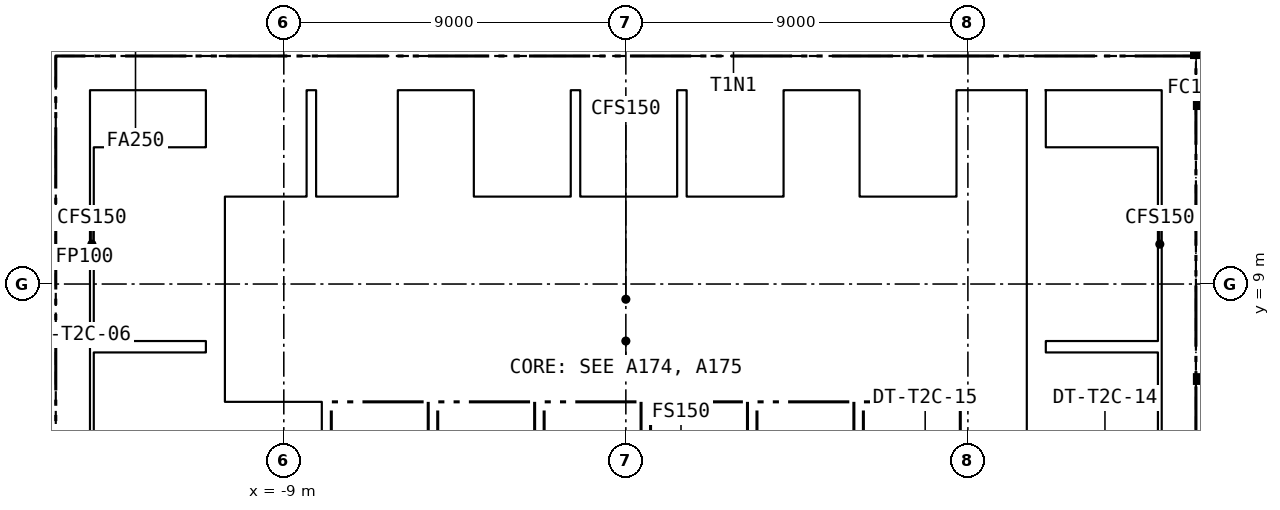
"""IFC4 building model, lengths in metres.
Left out: names, types, materials, properties, quantities, classifications, styles, units other than length and angle.
Written with IfcOpenShell. Run it as: python <this file> out.ifc"""

import sys

from ifc_helpers import new_model, si_unit, direction, frame, frame_2d, origin, place, context, subcontext, project, spatial, rectangle, extrude, element, fill, save


model = new_model("IFC4")
c1 = context("Model", 3, precision=1e-05, world=origin(), true_north=direction((0.0, 1.0)))
c2 = subcontext(c1, "Body", "Model", "MODEL_VIEW")
j1 = project(units=[si_unit("LENGTHUNIT", "METRE"), si_unit("PLANEANGLEUNIT", "RADIAN")], contexts=[c1])
p1 = place(None, origin())
s1 = spatial("IfcSite", under=j1, at=p1, CompositionType="ELEMENT")
p2 = place(p1, origin())
s2 = spatial("IfcBuilding", under=s1, at=p2, CompositionType="ELEMENT")
p3 = place(p2, frame((0.0, 0.0, 102.55)))
s3 = spatial("IfcBuildingStorey", under=s2, at=p3, CompositionType="ELEMENT", Elevation=102.55)
p4 = place(p3, frame((-15.0, 14.55, -0.15), z_axis=(0.0, 0.0, 1.0), x_axis=(1.0, 0.0, 0.0)))
e1 = element("IfcWall", 1, at=p4, inside=s3, PredefinedType="SOLIDWALL", context=c2, shape_type="SweptSolid", body=[
    extrude(rectangle(XDim=30.0, YDim=0.9, at=frame_2d((15.0, 0.0))), origin(), (0.0, 0.0, 1.0), 3.65),
])
p5 = place(p4, frame((9.25, 0.0, 0.15)))
e2 = element("IfcOpeningElement", 2, at=p5, cuts=e1, PredefinedType="OPENING", context=c2, shape_type="SweptSolid", body=[
    extrude(rectangle(XDim=1.5, YDim=2.1, at=frame_2d((0.75, 1.05))), frame((0.0, 0.46, 0.0), z_axis=(0.0, -1.0, 0.0), x_axis=(1.0, 0.0, 0.0)), (0.0, 0.0, 1.0), 0.92),
])
p6 = place(p4, frame((19.4, 0.0, 0.15)))
e3 = element("IfcOpeningElement", 3, at=p6, cuts=e1, PredefinedType="OPENING", context=c2, shape_type="SweptSolid", body=[
    extrude(rectangle(XDim=1.5, YDim=2.1, at=frame_2d((0.75, 1.05))), frame((0.0, 0.46, 0.0), z_axis=(0.0, -1.0, 0.0), x_axis=(1.0, 0.0, 0.0)), (0.0, 0.0, 1.0), 0.92),
])
p7 = place(p4, frame((1.5, 0.0, 0.15)))
e4 = element("IfcOpeningElement", 4, at=p7, cuts=e1, PredefinedType="OPENING", context=c2, shape_type="SweptSolid", body=[
    extrude(rectangle(XDim=1.2, YDim=2.1, at=frame_2d((0.6, 1.05))), frame((0.0, 0.46, 0.0), z_axis=(0.0, -1.0, 0.0), x_axis=(1.0, 0.0, 0.0)), (0.0, 0.0, 1.0), 0.92),
])
p8 = place(p4, frame((27.3, 0.0, 0.15)))
e5 = element("IfcOpeningElement", 5, at=p8, cuts=e1, PredefinedType="OPENING", context=c2, shape_type="SweptSolid", body=[
    extrude(rectangle(XDim=1.2, YDim=2.1, at=frame_2d((0.6, 1.05))), frame((0.0, 0.46, 0.0), z_axis=(0.0, -1.0, 0.0), x_axis=(1.0, 0.0, 0.0)), (0.0, 0.0, 1.0), 0.92),
])
for number, where, z_axis, x_axis in (
    (6, (-14.55, 0.9, -0.15), (0.0, 0.0, 1.0), (0.0, 1.0, 0.0)),
    (7, (14.55, 0.9, -0.15), (0.0, 0.0, 1.0), (0.0, 1.0, 0.0)),
):
    element("IfcWall", number, at=place(p3, frame(where, z_axis=z_axis, x_axis=x_axis)), inside=s3, PredefinedType="SOLIDWALL", context=c2, shape_type="SweptSolid", body=[
        extrude(rectangle(XDim=13.2, YDim=0.9, at=frame_2d((6.6, 0.0))), origin(), (0.0, 0.0, 1.0), 3.65),
    ])
for number, where, z_axis, x_axis in (
    (8, (-10.8, 0.9, -0.15), (0.0, 0.0, 1.0), (0.0, 1.0, 0.0)),
    (9, (10.8, 0.9, -0.15), (0.0, 0.0, 1.0), (0.0, 1.0, 0.0)),
):
    element("IfcWall", number, at=place(p3, frame(where, z_axis=z_axis, x_axis=x_axis)), inside=s3, PredefinedType="SOLIDWALL", context=c2, shape_type="SweptSolid", body=[
        extrude(rectangle(XDim=13.2, YDim=0.5, at=frame_2d((6.6, 0.0))), origin(), (0.0, 0.0, 1.0), 3.65),
    ])
p9 = place(p3, frame((-10.55, 6.025, 0.0), z_axis=(0.0, 0.0, 1.0), x_axis=(1.0, 0.0, 0.0)))
e10 = element("IfcWall", 10, at=p9, inside=s3, PredefinedType="PARTITIONING", context=c2, shape_type="SweptSolid", body=[
    extrude(rectangle(XDim=21.1, YDim=0.25, at=frame_2d((10.55, 0.0))), origin(), (0.0, 0.0, 1.0), 3.5),
])
p10 = place(p3, frame((-4.125, 8.55, 0.0), z_axis=(0.0, 0.0, 1.0), x_axis=(1.0, 0.0, 0.0)))
e11 = element("IfcWall", 11, at=p10, inside=s3, PredefinedType="PARTITIONING", context=c2, shape_type="SweptSolid", body=[
    extrude(rectangle(XDim=14.675, YDim=0.2, at=frame_2d((7.337, 0.0))), origin(), (0.0, 0.0, 1.0), 3.5),
])
p11 = place(p10, frame((1.413, 0.0, 0.0)))
e12 = element("IfcOpeningElement", 12, at=p11, cuts=e11, PredefinedType="OPENING", context=c2, shape_type="SweptSolid", body=[
    extrude(rectangle(XDim=1.0, YDim=2.1, at=frame_2d((0.5, 1.05))), frame((0.0, 0.11, 0.0), z_axis=(0.0, -1.0, 0.0), x_axis=(1.0, 0.0, 0.0)), (0.0, 0.0, 1.0), 0.22),
])
p12 = place(p10, frame((5.0, 0.0, 0.0)))
e13 = element("IfcOpeningElement", 13, at=p12, cuts=e11, PredefinedType="OPENING", context=c2, shape_type="SweptSolid", body=[
    extrude(rectangle(XDim=1.0, YDim=2.1, at=frame_2d((0.5, 1.05))), frame((0.0, 0.11, 0.0), z_axis=(0.0, -1.0, 0.0), x_axis=(1.0, 0.0, 0.0)), (0.0, 0.0, 1.0), 0.22),
])
p13 = place(p10, frame((9.613, 0.0, 0.0)))
e14 = element("IfcOpeningElement", 14, at=p13, cuts=e11, PredefinedType="OPENING", context=c2, shape_type="SweptSolid", body=[
    extrude(rectangle(XDim=1.0, YDim=2.1, at=frame_2d((0.5, 1.05))), frame((0.0, 0.11, 0.0), z_axis=(0.0, -1.0, 0.0), x_axis=(1.0, 0.0, 0.0)), (0.0, 0.0, 1.0), 0.22),
])
p14 = place(p10, frame((13.475, 0.0, 0.0)))
e15 = element("IfcOpeningElement", 15, at=p14, cuts=e11, PredefinedType="OPENING", context=c2, shape_type="SweptSolid", body=[
    extrude(rectangle(XDim=0.9, YDim=2.1, at=frame_2d((0.45, 1.05))), frame((0.0, 0.11, 0.0), z_axis=(0.0, -1.0, 0.0), x_axis=(1.0, 0.0, 0.0)), (0.0, 0.0, 1.0), 0.22),
])
p15 = place(p3, frame((-10.55, 11.2, 0.0), z_axis=(0.0, 0.0, 1.0), x_axis=(1.0, 0.0, 0.0)))
e16 = element("IfcWall", 16, at=p15, inside=s3, PredefinedType="PARTITIONING", context=c2, shape_type="SweptSolid", body=[
    extrude(rectangle(XDim=4.8, YDim=0.2, at=frame_2d((2.4, 0.0))), origin(), (0.0, 0.0, 1.0), 3.5),
])
p16 = place(p15, frame((0.525, 0.0, 0.0)))
e17 = element("IfcOpeningElement", 17, at=p16, cuts=e16, PredefinedType="OPENING", context=c2, shape_type="SweptSolid", body=[
    extrude(rectangle(XDim=1.1, YDim=2.1, at=frame_2d((0.55, 1.05))), frame((0.0, 0.11, 0.0), z_axis=(0.0, -1.0, 0.0), x_axis=(1.0, 0.0, 0.0)), (0.0, 0.0, 1.0), 0.22),
])
p17 = place(p15, frame((2.925, 0.0, 0.0)))
e18 = element("IfcOpeningElement", 18, at=p17, cuts=e16, PredefinedType="OPENING", context=c2, shape_type="SweptSolid", body=[
    extrude(rectangle(XDim=1.1, YDim=2.1, at=frame_2d((0.55, 1.05))), frame((0.0, 0.11, 0.0), z_axis=(0.0, -1.0, 0.0), x_axis=(1.0, 0.0, 0.0)), (0.0, 0.0, 1.0), 0.22),
])
p18 = place(p3, frame((-4.25, 11.2, 0.0), z_axis=(0.0, 0.0, 1.0), x_axis=(1.0, 0.0, 0.0)))
e19 = element("IfcWall", 19, at=p18, inside=s3, PredefinedType="PARTITIONING", context=c2, shape_type="SweptSolid", body=[
    extrude(rectangle(XDim=8.65, YDim=0.2, at=frame_2d((4.325, 0.0))), origin(), (0.0, 0.0, 1.0), 3.5),
])
p19 = place(p18, frame((0.825, 0.0, 0.0)))
e20 = element("IfcOpeningElement", 20, at=p19, cuts=e19, PredefinedType="OPENING", context=c2, shape_type="SweptSolid", body=[
    extrude(rectangle(XDim=1.4, YDim=2.1, at=frame_2d((0.7, 1.05))), frame((0.0, 0.11, 0.0), z_axis=(0.0, -1.0, 0.0), x_axis=(1.0, 0.0, 0.0)), (0.0, 0.0, 1.0), 0.22),
])
p20 = place(p18, frame((3.625, 0.0, 0.0)))
e21 = element("IfcOpeningElement", 21, at=p20, cuts=e19, PredefinedType="OPENING", context=c2, shape_type="SweptSolid", body=[
    extrude(rectangle(XDim=1.4, YDim=2.1, at=frame_2d((0.7, 1.05))), frame((0.0, 0.11, 0.0), z_axis=(0.0, -1.0, 0.0), x_axis=(1.0, 0.0, 0.0)), (0.0, 0.0, 1.0), 0.22),
])
p21 = place(p3, frame((5.9, 11.2, 0.0), z_axis=(0.0, 0.0, 1.0), x_axis=(1.0, 0.0, 0.0)))
e22 = element("IfcWall", 22, at=p21, inside=s3, PredefinedType="PARTITIONING", context=c2, shape_type="SweptSolid", body=[
    extrude(rectangle(XDim=4.65, YDim=0.2, at=frame_2d((2.325, 0.0))), origin(), (0.0, 0.0, 1.0), 3.5),
])
p22 = place(p21, frame((3.4, 0.0, 0.0)))
e23 = element("IfcOpeningElement", 23, at=p22, cuts=e22, PredefinedType="OPENING", context=c2, shape_type="SweptSolid", body=[
    extrude(rectangle(XDim=0.9, YDim=2.1, at=frame_2d((0.45, 1.05))), frame((0.0, 0.11, 0.0), z_axis=(0.0, -1.0, 0.0), x_axis=(1.0, 0.0, 0.0)), (0.0, 0.0, 1.0), 0.22),
])
p23 = place(p3, frame((-4.125, 6.15, 0.0), z_axis=(0.0, 0.0, 1.0), x_axis=(0.0, 1.0, 0.0)))
e24 = element("IfcWall", 24, at=p23, inside=s3, PredefinedType="PARTITIONING", context=c2, shape_type="SweptSolid", body=[
    extrude(rectangle(XDim=4.95, YDim=0.25, at=frame_2d((2.475, 0.0))), origin(), (0.0, 0.0, 1.0), 3.5),
])
p24 = place(p23, frame((3.125, 0.0, 0.0)))
e25 = element("IfcOpeningElement", 25, at=p24, cuts=e24, PredefinedType="OPENING", context=c2, shape_type="SweptSolid", body=[
    extrude(rectangle(XDim=1.2, YDim=2.1, at=frame_2d((0.6, 1.05))), frame((0.0, 0.135, 0.0), z_axis=(0.0, -1.0, 0.0), x_axis=(1.0, 0.0, 0.0)), (0.0, 0.0, 1.0), 0.27),
])
for number, where, z_axis, x_axis in (
    (26, (-7.875, 3.6, 0.0), (0.0, 0.0, 1.0), (0.0, 1.0, 0.0)),
    (27, (-5.075, 3.6, 0.0), (0.0, 0.0, 1.0), (0.0, 1.0, 0.0)),
    (28, (-2.275, 3.6, 0.0), (0.0, 0.0, 1.0), (0.0, 1.0, 0.0)),
    (29, (0.525, 3.6, 0.0), (0.0, 0.0, 1.0), (0.0, 1.0, 0.0)),
    (30, (3.325, 3.6, 0.0), (0.0, 0.0, 1.0), (0.0, 1.0, 0.0)),
    (31, (6.125, 3.6, 0.0), (0.0, 0.0, 1.0), (0.0, 1.0, 0.0)),
    (32, (8.925, 3.6, 0.0), (0.0, 0.0, 1.0), (0.0, 1.0, 0.0)),
):
    element("IfcWall", number, at=place(p3, frame(where, z_axis=z_axis, x_axis=x_axis)), inside=s3, PredefinedType="PARTITIONING", context=c2, shape_type="SweptSolid", body=[
        extrude(rectangle(XDim=2.3, YDim=0.25, at=frame_2d((1.15, 0.0))), origin(), (0.0, 0.0, 1.0), 3.5),
    ])
for number, where, z_axis, x_axis in (
    (33, (-0.35, 6.15, 0.0), (0.0, 0.0, 1.0), (0.0, 1.0, 0.0)),
    (34, (3.1, 6.15, 0.0), (0.0, 0.0, 1.0), (0.0, 1.0, 0.0)),
):
    element("IfcWall", number, at=place(p3, frame(where, z_axis=z_axis, x_axis=x_axis)), inside=s3, PredefinedType="PARTITIONING", context=c2, shape_type="SweptSolid", body=[
        extrude(rectangle(XDim=2.3, YDim=0.15, at=frame_2d((1.15, 0.0))), origin(), (0.0, 0.0, 1.0), 3.5),
    ])
p25 = place(p3, frame((8.925, 6.15, 0.0), z_axis=(0.0, 0.0, 1.0), x_axis=(0.0, 1.0, 0.0)))
e35 = element("IfcWall", 35, at=p25, inside=s3, PredefinedType="PARTITIONING", context=c2, shape_type="SweptSolid", body=[
    extrude(rectangle(XDim=2.3, YDim=0.25, at=frame_2d((1.15, 0.0))), origin(), (0.0, 0.0, 1.0), 3.5),
])
for number, where, z_axis, x_axis in (
    (36, (-8.275, 11.3, 0.0), (0.0, 0.0, 1.0), (0.0, 1.0, 0.0)),
    (37, (-5.875, 11.3, 0.0), (0.0, 0.0, 1.0), (0.0, 1.0, 0.0)),
    (38, (-4.125, 11.3, 0.0), (0.0, 0.0, 1.0), (0.0, 1.0, 0.0)),
    (39, (-1.325, 11.3, 0.0), (0.0, 0.0, 1.0), (0.0, 1.0, 0.0)),
    (40, (1.475, 11.3, 0.0), (0.0, 0.0, 1.0), (0.0, 1.0, 0.0)),
    (41, (4.275, 11.3, 0.0), (0.0, 0.0, 1.0), (0.0, 1.0, 0.0)),
    (42, (6.025, 11.3, 0.0), (0.0, 0.0, 1.0), (0.0, 1.0, 0.0)),
    (43, (8.825, 11.3, 0.0), (0.0, 0.0, 1.0), (0.0, 1.0, 0.0)),
):
    element("IfcWall", number, at=place(p3, frame(where, z_axis=z_axis, x_axis=x_axis)), inside=s3, PredefinedType="PARTITIONING", context=c2, shape_type="SweptSolid", body=[
        extrude(rectangle(XDim=2.8, YDim=0.25, at=frame_2d((1.4, 0.0))), origin(), (0.0, 0.0, 1.0), 3.5),
    ])
p26 = place(p3, frame((-14.0, 7.35, 0.0), z_axis=(0.0, 0.0, 1.0), x_axis=(1.0, 0.0, 0.0)))
e44 = element("IfcWall", 44, at=p26, inside=s3, PredefinedType="SOLIDWALL", context=c2, shape_type="SweptSolid", body=[
    extrude(rectangle(XDim=2.95, YDim=0.3, at=frame_2d((1.475, 0.0))), origin(), (0.0, 0.0, 1.0), 3.5),
])
p27 = place(p3, frame((-14.05, 0.9, 0.0), z_axis=(0.0, 0.0, 1.0), x_axis=(0.0, 1.0, 0.0)))
e45 = element("IfcWall", 45, at=p27, inside=s3, PredefinedType="SOLIDWALL", context=c2, shape_type="SweptSolid", body=[
    extrude(rectangle(XDim=13.2, YDim=0.1, at=frame_2d((6.6, 0.0))), origin(), (0.0, 0.0, 1.0), 3.5),
])
p28 = place(p3, frame((11.05, 7.35, 0.0), z_axis=(0.0, 0.0, 1.0), x_axis=(1.0, 0.0, 0.0)))
e46 = element("IfcWall", 46, at=p28, inside=s3, PredefinedType="SOLIDWALL", context=c2, shape_type="SweptSolid", body=[
    extrude(rectangle(XDim=2.95, YDim=0.3, at=frame_2d((1.475, 0.0))), origin(), (0.0, 0.0, 1.0), 3.5),
])
p29 = place(p3, frame((14.05, 0.9, 0.0), z_axis=(0.0, 0.0, 1.0), x_axis=(0.0, 1.0, 0.0)))
e47 = element("IfcWall", 47, at=p29, inside=s3, PredefinedType="SOLIDWALL", context=c2, shape_type="SweptSolid", body=[
    extrude(rectangle(XDim=13.2, YDim=0.1, at=frame_2d((6.6, 0.0))), origin(), (0.0, 0.0, 1.0), 3.5),
])
p30 = place(p3, frame((15.0, 18.542, 0.0), z_axis=(0.0, 0.0, 1.0), x_axis=(0.0, -1.0, 0.0)))
e48 = element("IfcWall", 48, at=p30, inside=s3, PredefinedType="PARTITIONING", context=c2, shape_type="SweptSolid", body=[
    extrude(rectangle(XDim=3.542, YDim=0.15, at=frame_2d((1.771, 0.0))), origin(), (0.0, 0.0, 1.0), 2.741),
])
p31 = place(p3, frame((15.0, 13.709, 0.0), z_axis=(0.0, 0.0, 1.0), x_axis=(1.0, 0.0, 0.0)))
e49 = element("IfcWall", 49, at=p31, inside=s3, PredefinedType="PARTITIONING", context=c2, shape_type="SweptSolid", body=[
    extrude(rectangle(XDim=13.668, YDim=0.1, at=frame_2d((6.834, 0.0))), origin(), (0.0, 0.0, 1.0), 2.741),
])
p32 = place(p3, frame((15.0, 6.5, 0.0), z_axis=(0.0, 0.0, 1.0), x_axis=(1.0, 0.0, 0.0)))
e50 = element("IfcWall", 50, at=p32, inside=s3, PredefinedType="PARTITIONING", context=c2, shape_type="SweptSolid", body=[
    extrude(rectangle(XDim=2.223, YDim=0.15, at=frame_2d((1.111, 0.0))), origin(), (0.0, 0.0, 1.0), 2.741),
])
p33 = place(p24, origin())
e51 = element("IfcDoor", 51, at=p33, inside=s3, OperationType="SINGLE_SWING_LEFT", PredefinedType="DOOR", context=c2, shape_type="SweptSolid", body=[
    extrude(rectangle(XDim=1.2, YDim=2.1, at=frame_2d((0.6, 1.05))), frame((0.0, 0.025, 0.0), z_axis=(0.0, -1.0, 0.0), x_axis=(1.0, 0.0, 0.0)), (0.0, 0.0, 1.0), 0.05),
])
fill(e25, e51)
p34 = place(p11, origin())
e52 = element("IfcDoor", 52, at=p34, inside=s3, OperationType="SINGLE_SWING_LEFT", PredefinedType="DOOR", context=c2, shape_type="SweptSolid", body=[
    extrude(rectangle(XDim=1.0, YDim=2.1, at=frame_2d((0.5, 1.05))), frame((0.0, 0.025, 0.0), z_axis=(0.0, -1.0, 0.0), x_axis=(1.0, 0.0, 0.0)), (0.0, 0.0, 1.0), 0.05),
])
fill(e12, e52)
p35 = place(p12, origin())
e53 = element("IfcDoor", 53, at=p35, inside=s3, OperationType="SINGLE_SWING_RIGHT", PredefinedType="DOOR", context=c2, shape_type="SweptSolid", body=[
    extrude(rectangle(XDim=1.0, YDim=2.1, at=frame_2d((0.5, 1.05))), frame((0.0, 0.025, 0.0), z_axis=(0.0, -1.0, 0.0), x_axis=(1.0, 0.0, 0.0)), (0.0, 0.0, 1.0), 0.05),
])
fill(e13, e53)
p36 = place(p13, origin())
e54 = element("IfcDoor", 54, at=p36, inside=s3, OperationType="SINGLE_SWING_LEFT", PredefinedType="DOOR", context=c2, shape_type="SweptSolid", body=[
    extrude(rectangle(XDim=1.0, YDim=2.1, at=frame_2d((0.5, 1.05))), frame((0.0, 0.025, 0.0), z_axis=(0.0, -1.0, 0.0), x_axis=(1.0, 0.0, 0.0)), (0.0, 0.0, 1.0), 0.05),
])
fill(e14, e54)
p37 = place(p14, origin())
e55 = element("IfcDoor", 55, at=p37, inside=s3, OperationType="SINGLE_SWING_RIGHT", PredefinedType="DOOR", context=c2, shape_type="SweptSolid", body=[
    extrude(rectangle(XDim=0.9, YDim=2.1, at=frame_2d((0.45, 1.05))), frame((0.0, 0.025, 0.0), z_axis=(0.0, -1.0, 0.0), x_axis=(1.0, 0.0, 0.0)), (0.0, 0.0, 1.0), 0.05),
])
fill(e15, e55)
p38 = place(p16, origin())
e56 = element("IfcDoor", 56, at=p38, inside=s3, OperationType="DOUBLE_DOOR_SLIDING", PredefinedType="DOOR", context=c2, shape_type="SweptSolid", body=[
    extrude(rectangle(XDim=1.1, YDim=2.1, at=frame_2d((0.55, 1.05))), frame((0.0, 0.025, 0.0), z_axis=(0.0, -1.0, 0.0), x_axis=(1.0, 0.0, 0.0)), (0.0, 0.0, 1.0), 0.05),
])
fill(e17, e56)
p39 = place(p17, origin())
e57 = element("IfcDoor", 57, at=p39, inside=s3, OperationType="DOUBLE_DOOR_SLIDING", PredefinedType="DOOR", context=c2, shape_type="SweptSolid", body=[
    extrude(rectangle(XDim=1.1, YDim=2.1, at=frame_2d((0.55, 1.05))), frame((0.0, 0.025, 0.0), z_axis=(0.0, -1.0, 0.0), x_axis=(1.0, 0.0, 0.0)), (0.0, 0.0, 1.0), 0.05),
])
fill(e18, e57)
p40 = place(p19, origin())
e58 = element("IfcDoor", 58, at=p40, inside=s3, OperationType="DOUBLE_DOOR_SLIDING", PredefinedType="DOOR", context=c2, shape_type="SweptSolid", body=[
    extrude(rectangle(XDim=1.4, YDim=2.1, at=frame_2d((0.7, 1.05))), frame((0.0, 0.025, 0.0), z_axis=(0.0, -1.0, 0.0), x_axis=(1.0, 0.0, 0.0)), (0.0, 0.0, 1.0), 0.05),
])
fill(e20, e58)
p41 = place(p20, origin())
e59 = element("IfcDoor", 59, at=p41, inside=s3, OperationType="DOUBLE_DOOR_SLIDING", PredefinedType="DOOR", context=c2, shape_type="SweptSolid", body=[
    extrude(rectangle(XDim=1.4, YDim=2.1, at=frame_2d((0.7, 1.05))), frame((0.0, 0.025, 0.0), z_axis=(0.0, -1.0, 0.0), x_axis=(1.0, 0.0, 0.0)), (0.0, 0.0, 1.0), 0.05),
])
fill(e21, e59)
p42 = place(p22, origin())
e60 = element("IfcDoor", 60, at=p42, inside=s3, OperationType="SINGLE_SWING_LEFT", PredefinedType="DOOR", context=c2, shape_type="SweptSolid", body=[
    extrude(rectangle(XDim=0.9, YDim=2.1, at=frame_2d((0.45, 1.05))), frame((0.0, 0.025, 0.0), z_axis=(0.0, -1.0, 0.0), x_axis=(1.0, 0.0, 0.0)), (0.0, 0.0, 1.0), 0.05),
])
fill(e23, e60)
p43 = place(p5, origin())
e61 = element("IfcDoor", 61, at=p43, inside=s3, OperationType="DOUBLE_DOOR_SINGLE_SWING", PredefinedType="DOOR", context=c2, shape_type="SweptSolid", body=[
    extrude(rectangle(XDim=1.5, YDim=2.1, at=frame_2d((0.75, 1.05))), frame((0.0, 0.025, 0.0), z_axis=(0.0, -1.0, 0.0), x_axis=(1.0, 0.0, 0.0)), (0.0, 0.0, 1.0), 0.05),
])
fill(e2, e61)
p44 = place(p6, origin())
e62 = element("IfcDoor", 62, at=p44, inside=s3, OperationType="DOUBLE_DOOR_SINGLE_SWING", PredefinedType="DOOR", context=c2, shape_type="SweptSolid", body=[
    extrude(rectangle(XDim=1.5, YDim=2.1, at=frame_2d((0.75, 1.05))), frame((0.0, 0.025, 0.0), z_axis=(0.0, -1.0, 0.0), x_axis=(1.0, 0.0, 0.0)), (0.0, 0.0, 1.0), 0.05),
])
fill(e3, e62)
p45 = place(p7, origin())
e63 = element("IfcDoor", 63, at=p45, inside=s3, OperationType="SINGLE_SWING_RIGHT", PredefinedType="DOOR", context=c2, shape_type="SweptSolid", body=[
    extrude(rectangle(XDim=1.2, YDim=2.1, at=frame_2d((0.6, 1.05))), frame((0.0, 0.025, 0.0), z_axis=(0.0, -1.0, 0.0), x_axis=(1.0, 0.0, 0.0)), (0.0, 0.0, 1.0), 0.05),
])
fill(e4, e63)
p46 = place(p8, origin())
e64 = element("IfcDoor", 64, at=p46, inside=s3, OperationType="SINGLE_SWING_LEFT", PredefinedType="DOOR", context=c2, shape_type="SweptSolid", body=[
    extrude(rectangle(XDim=1.2, YDim=2.1, at=frame_2d((0.6, 1.05))), frame((0.0, 0.025, 0.0), z_axis=(0.0, -1.0, 0.0), x_axis=(1.0, 0.0, 0.0)), (0.0, 0.0, 1.0), 0.05),
])
fill(e5, e64)
save(model, sys.argv[1])
